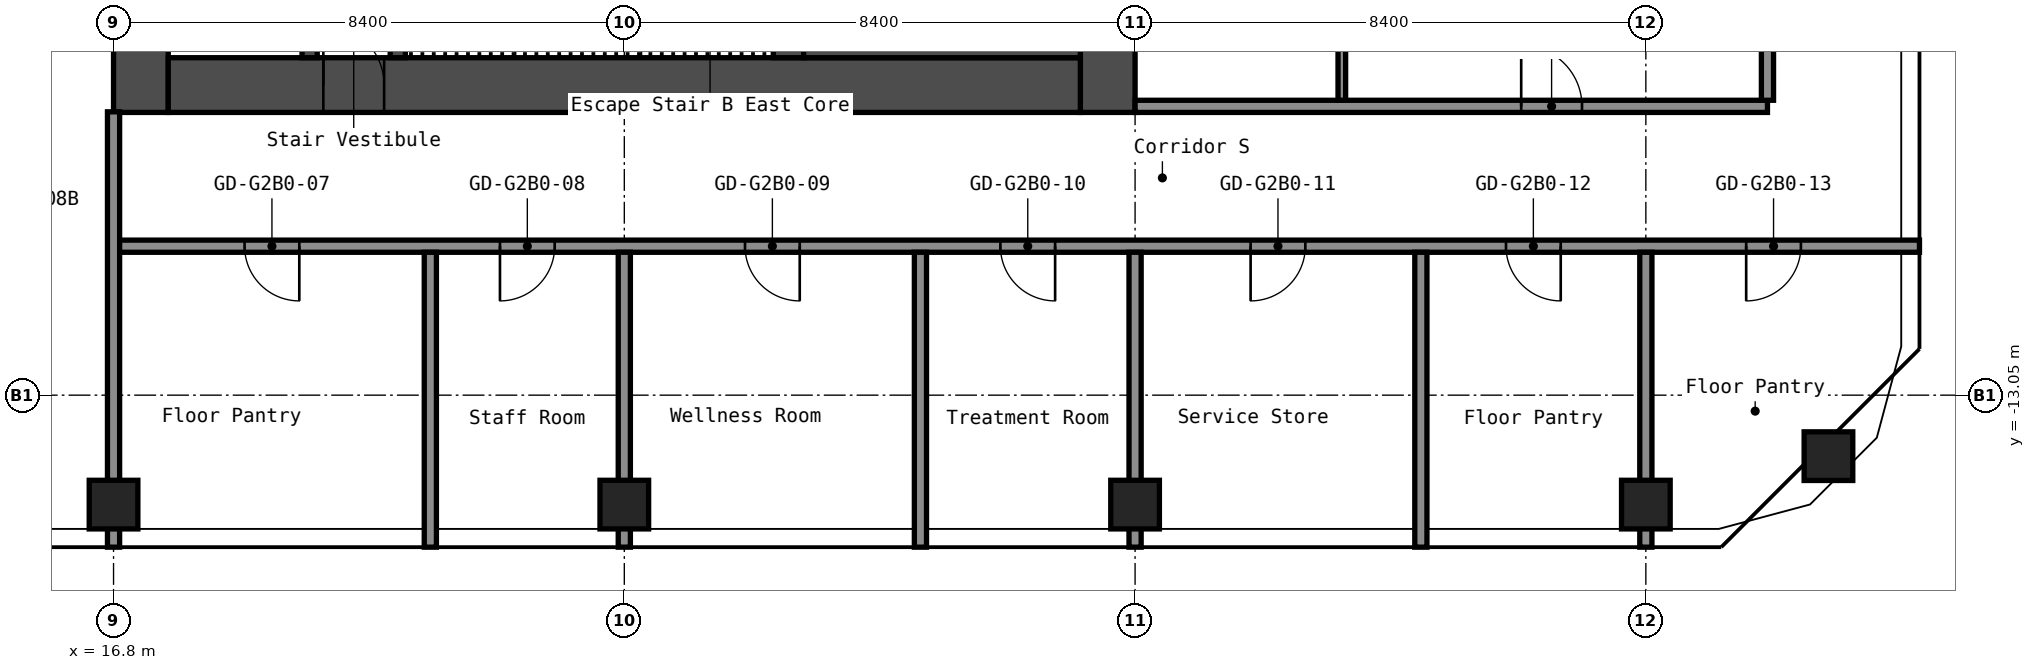
"""IFC4 building model, lengths in metres.
Left out: names, types, materials, properties, quantities, classifications, styles, units other than length and angle.
Written with IfcOpenShell. Run it as: python <this file> out.ifc"""

import sys

from ifc_helpers import new_model, si_unit, direction, frame, frame_2d, origin, origin_2d, place, context, subcontext, project, spatial, rectangle, hollow_rectangle, extrude, element, fill, save


model = new_model("IFC4")
c1 = context("Model", 3, precision=1e-05, world=origin(), true_north=direction((0.0, 1.0)))
c2 = subcontext(c1, "Body", "Model", "MODEL_VIEW")
j1 = project(units=[si_unit("LENGTHUNIT", "METRE"), si_unit("PLANEANGLEUNIT", "RADIAN")], contexts=[c1])
p1 = place(None, origin())
s1 = spatial("IfcSite", under=j1, at=p1, CompositionType="ELEMENT")
p2 = place(p1, origin())
s2 = spatial("IfcBuilding", under=s1, at=p2, CompositionType="ELEMENT")
p3 = place(p2, frame((0.0, 0.0, 78.6)))
s3 = spatial("IfcBuildingStorey", under=s2, at=p3, CompositionType="ELEMENT", Elevation=78.6)
for number, where, z_axis, x_axis in (
    (1, (16.8, -14.85, 0.0), (0.0, 0.0, 1.0), (1.0, 0.0, 0.0)),
    (2, (25.2, -14.85, 0.0), (0.0, 0.0, 1.0), (1.0, 0.0, 0.0)),
    (3, (33.6, -14.85, 0.0), (0.0, 0.0, 1.0), (1.0, 0.0, 0.0)),
    (4, (42.0, -14.85, 0.0), (0.0, 0.0, 1.0), (1.0, 0.0, 0.0)),
    (5, (45.003, -14.053, 0.0), (0.0, 0.0, 1.0), (1.0, 0.0, 0.0)),
):
    element("IfcColumn", number, at=place(p3, frame(where, z_axis=z_axis, x_axis=x_axis)), inside=s3, PredefinedType="COLUMN", context=c2, shape_type="SweptSolid", body=[
        extrude(hollow_rectangle(XDim=0.8, YDim=0.8, WallThickness=0.032, at=origin_2d()), origin(), (0.0, 0.0, 1.0), 2.8),
    ])
p4 = place(p3, frame((17.25, -8.4, 0.0), z_axis=(0.0, 0.0, 1.0), x_axis=(0.0, 1.0, 0.0)))
e6 = element("IfcWall", 6, at=p4, inside=s3, PredefinedType="SHEAR", context=c2, shape_type="SweptSolid", body=[
    extrude(rectangle(XDim=16.8, YDim=0.9, at=frame_2d((8.4, 0.0))), origin(), (0.0, 0.0, 1.0), 2.8),
])
p5 = place(p4, frame((7.6, 0.0, 0.0)))
e7 = element("IfcOpeningElement", 7, at=p5, cuts=e6, PredefinedType="OPENING", context=c2, shape_type="SweptSolid", body=[
    extrude(rectangle(XDim=1.2, YDim=2.1, at=frame_2d((0.6, 1.05))), frame((0.0, 0.46, 0.0), z_axis=(0.0, -1.0, 0.0), x_axis=(1.0, 0.0, 0.0)), (0.0, 0.0, 1.0), 0.92),
])
p6 = place(p3, frame((33.15, -8.4, 0.0), z_axis=(0.0, 0.0, 1.0), x_axis=(0.0, 1.0, 0.0)))
e8 = element("IfcWall", 8, at=p6, inside=s3, PredefinedType="SHEAR", context=c2, shape_type="SweptSolid", body=[
    extrude(rectangle(XDim=16.8, YDim=0.9, at=frame_2d((8.4, 0.0))), origin(), (0.0, 0.0, 1.0), 2.8),
])
p7 = place(p3, frame((17.7, -7.95, 0.0), z_axis=(0.0, 0.0, 1.0), x_axis=(1.0, 0.0, 0.0)))
e9 = element("IfcWall", 9, at=p7, inside=s3, PredefinedType="SHEAR", context=c2, shape_type="SweptSolid", body=[
    extrude(rectangle(XDim=15.0, YDim=0.9, at=frame_2d((7.5, 0.0))), origin(), (0.0, 0.0, 1.0), 2.8),
])
p8 = place(p7, frame((2.55, 0.0, 0.0)))
e10 = element("IfcOpeningElement", 10, at=p8, cuts=e9, PredefinedType="OPENING", context=c2, shape_type="SweptSolid", body=[
    extrude(rectangle(XDim=1.0, YDim=2.1, at=frame_2d((0.5, 1.05))), frame((0.0, 0.46, 0.0), z_axis=(0.0, -1.0, 0.0), x_axis=(1.0, 0.0, 0.0)), (0.0, 0.0, 1.0), 0.92),
])
p9 = place(p3, frame((20.025, -7.5, 0.0), z_axis=(0.0, 0.0, 1.0), x_axis=(0.0, 1.0, 0.0)))
e11 = element("IfcWall", 11, at=p9, inside=s3, PredefinedType="SHEAR", context=c2, shape_type="SweptSolid", body=[
    extrude(rectangle(XDim=6.3, YDim=0.25, at=frame_2d((3.15, 0.0))), origin(), (0.0, 0.0, 1.0), 2.8),
])
p10 = place(p9, frame((2.4, 0.0, 0.0)))
e12 = element("IfcOpeningElement", 12, at=p10, cuts=e11, PredefinedType="OPENING", context=c2, shape_type="SweptSolid", body=[
    extrude(rectangle(XDim=1.0, YDim=2.1, at=frame_2d((0.5, 1.05))), frame((0.0, 0.135, 0.0), z_axis=(0.0, -1.0, 0.0), x_axis=(1.0, 0.0, 0.0)), (0.0, 0.0, 1.0), 0.27),
])
p11 = place(p3, frame((21.475, -7.5, 0.0), z_axis=(0.0, 0.0, 1.0), x_axis=(0.0, 1.0, 0.0)))
e13 = element("IfcWall", 13, at=p11, inside=s3, PredefinedType="SHEAR", context=c2, shape_type="SweptSolid", body=[
    extrude(rectangle(XDim=3.75, YDim=0.25, at=frame_2d((1.875, 0.0))), origin(), (0.0, 0.0, 1.0), 2.8),
])
p12 = place(p11, frame((1.3, 0.0, 0.0)))
e14 = element("IfcOpeningElement", 14, at=p12, cuts=e13, PredefinedType="OPENING", context=c2, shape_type="SweptSolid", body=[
    extrude(rectangle(XDim=1.2, YDim=2.1, at=frame_2d((0.6, 1.05))), frame((0.0, 0.135, 0.0), z_axis=(0.0, -1.0, 0.0), x_axis=(1.0, 0.0, 0.0)), (0.0, 0.0, 1.0), 0.27),
])
p13 = place(p3, frame((27.9, -7.5, 0.0), z_axis=(0.0, 0.0, 1.0), x_axis=(0.0, 1.0, 0.0)))
e15 = element("IfcWall", 15, at=p13, inside=s3, PredefinedType="SHEAR", context=c2, shape_type="SweptSolid", body=[
    extrude(rectangle(XDim=3.75, YDim=0.5, at=frame_2d((1.875, 0.0))), origin(), (0.0, 0.0, 1.0), 2.8),
])
p14 = place(p3, frame((28.15, -6.75, 0.0), z_axis=(0.0, 0.0, 1.0), x_axis=(1.0, 0.0, 0.0)))
e16 = element("IfcWall", 16, at=p14, inside=s3, PredefinedType="SHEAR", context=c2, shape_type="SweptSolid", body=[
    extrude(rectangle(XDim=4.55, YDim=1.5, at=frame_2d((2.275, 0.0))), origin(), (0.0, 0.0, 1.0), 2.8),
])
p15 = place(p3, frame((16.8, -10.6, 0.0), z_axis=(0.0, 0.0, 1.0), x_axis=(1.0, 0.0, 0.0)))
e17 = element("IfcWall", 17, at=p15, inside=s3, PredefinedType="PARTITIONING", context=c2, shape_type="SweptSolid", body=[
    extrude(rectangle(XDim=29.7, YDim=0.2, at=frame_2d((14.85, 0.0))), origin(), (0.0, 0.0, 1.0), 2.8),
])
p16 = place(p15, frame((2.155, 0.0, 0.0)))
e18 = element("IfcOpeningElement", 18, at=p16, cuts=e17, PredefinedType="OPENING", context=c2, shape_type="SweptSolid", body=[
    extrude(rectangle(XDim=0.9, YDim=2.1, at=frame_2d((0.45, 1.05))), frame((0.0, 0.11, 0.0), z_axis=(0.0, -1.0, 0.0), x_axis=(1.0, 0.0, 0.0)), (0.0, 0.0, 1.0), 0.22),
])
p17 = place(p15, frame((6.355, 0.0, 0.0)))
e19 = element("IfcOpeningElement", 19, at=p17, cuts=e17, PredefinedType="OPENING", context=c2, shape_type="SweptSolid", body=[
    extrude(rectangle(XDim=0.9, YDim=2.1, at=frame_2d((0.45, 1.05))), frame((0.0, 0.11, 0.0), z_axis=(0.0, -1.0, 0.0), x_axis=(1.0, 0.0, 0.0)), (0.0, 0.0, 1.0), 0.22),
])
p18 = place(p15, frame((10.385, 0.0, 0.0)))
e20 = element("IfcOpeningElement", 20, at=p18, cuts=e17, PredefinedType="OPENING", context=c2, shape_type="SweptSolid", body=[
    extrude(rectangle(XDim=0.9, YDim=2.1, at=frame_2d((0.45, 1.05))), frame((0.0, 0.11, 0.0), z_axis=(0.0, -1.0, 0.0), x_axis=(1.0, 0.0, 0.0)), (0.0, 0.0, 1.0), 0.22),
])
p19 = place(p15, frame((14.585, 0.0, 0.0)))
e21 = element("IfcOpeningElement", 21, at=p19, cuts=e17, PredefinedType="OPENING", context=c2, shape_type="SweptSolid", body=[
    extrude(rectangle(XDim=0.9, YDim=2.1, at=frame_2d((0.45, 1.05))), frame((0.0, 0.11, 0.0), z_axis=(0.0, -1.0, 0.0), x_axis=(1.0, 0.0, 0.0)), (0.0, 0.0, 1.0), 0.22),
])
p20 = place(p15, frame((18.7, 0.0, 0.0)))
e22 = element("IfcOpeningElement", 22, at=p20, cuts=e17, PredefinedType="OPENING", context=c2, shape_type="SweptSolid", body=[
    extrude(rectangle(XDim=0.9, YDim=2.1, at=frame_2d((0.45, 1.05))), frame((0.0, 0.11, 0.0), z_axis=(0.0, -1.0, 0.0), x_axis=(1.0, 0.0, 0.0)), (0.0, 0.0, 1.0), 0.22),
])
p21 = place(p15, frame((22.9, 0.0, 0.0)))
e23 = element("IfcOpeningElement", 23, at=p21, cuts=e17, PredefinedType="OPENING", context=c2, shape_type="SweptSolid", body=[
    extrude(rectangle(XDim=0.9, YDim=2.1, at=frame_2d((0.45, 1.05))), frame((0.0, 0.11, 0.0), z_axis=(0.0, -1.0, 0.0), x_axis=(1.0, 0.0, 0.0)), (0.0, 0.0, 1.0), 0.22),
])
p22 = place(p15, frame((26.85, 0.0, 0.0)))
e24 = element("IfcOpeningElement", 24, at=p22, cuts=e17, PredefinedType="OPENING", context=c2, shape_type="SweptSolid", body=[
    extrude(rectangle(XDim=0.9, YDim=2.1, at=frame_2d((0.45, 1.05))), frame((0.0, 0.11, 0.0), z_axis=(0.0, -1.0, 0.0), x_axis=(1.0, 0.0, 0.0)), (0.0, 0.0, 1.0), 0.22),
])
p23 = place(p3, frame((33.6, -8.3, 0.0), z_axis=(0.0, 0.0, 1.0), x_axis=(1.0, 0.0, 0.0)))
e25 = element("IfcWall", 25, at=p23, inside=s3, PredefinedType="PARTITIONING", context=c2, shape_type="SweptSolid", body=[
    extrude(rectangle(XDim=10.4, YDim=0.2, at=frame_2d((5.2, 0.0))), origin(), (0.0, 0.0, 1.0), 2.8),
])
p24 = place(p23, frame((6.35, 0.0, 0.0)))
e26 = element("IfcOpeningElement", 26, at=p24, cuts=e25, PredefinedType="OPENING", context=c2, shape_type="SweptSolid", body=[
    extrude(rectangle(XDim=1.0, YDim=2.1, at=frame_2d((0.5, 1.05))), frame((0.0, 0.11, 0.0), z_axis=(0.0, -1.0, 0.0), x_axis=(1.0, 0.0, 0.0)), (0.0, 0.0, 1.0), 0.22),
])
p25 = place(p3, frame((16.8, -15.55, 0.0), z_axis=(0.0, 0.0, 1.0), x_axis=(0.0, 1.0, 0.0)))
e27 = element("IfcWall", 27, at=p25, inside=s3, PredefinedType="PARTITIONING", context=c2, shape_type="SweptSolid", body=[
    extrude(rectangle(XDim=7.16, YDim=0.2, at=frame_2d((3.58, 0.0))), origin(), (0.0, 0.0, 1.0), 2.8),
])
for number, where, z_axis, x_axis in (
    (28, (22.01, -15.55, 0.0), (0.0, 0.0, 1.0), (0.0, 1.0, 0.0)),
    (29, (25.2, -15.55, 0.0), (0.0, 0.0, 1.0), (0.0, 1.0, 0.0)),
    (30, (30.07, -15.55, 0.0), (0.0, 0.0, 1.0), (0.0, 1.0, 0.0)),
    (31, (33.6, -15.55, 0.0), (0.0, 0.0, 1.0), (0.0, 1.0, 0.0)),
):
    element("IfcWall", number, at=place(p3, frame(where, z_axis=z_axis, x_axis=x_axis)), inside=s3, PredefinedType="PARTITIONING", context=c2, shape_type="SweptSolid", body=[
        extrude(rectangle(XDim=4.85, YDim=0.2, at=frame_2d((2.425, 0.0))), origin(), (0.0, 0.0, 1.0), 2.8),
    ])
p26 = place(p3, frame((37.0, -8.2, 0.0), z_axis=(0.0, 0.0, 1.0), x_axis=(0.0, 1.0, 0.0)))
e32 = element("IfcWall", 32, at=p26, inside=s3, PredefinedType="PARTITIONING", context=c2, shape_type="SweptSolid", body=[
    extrude(rectangle(XDim=3.3, YDim=0.125, at=frame_2d((1.65, 0.0))), origin(), (0.0, 0.0, 1.0), 2.8),
])
for number, where, z_axis, x_axis in (
    (33, (38.3, -15.55, 0.0), (0.0, 0.0, 1.0), (0.0, 1.0, 0.0)),
    (34, (42.0, -15.55, 0.0), (0.0, 0.0, 1.0), (0.0, 1.0, 0.0)),
):
    element("IfcWall", number, at=place(p3, frame(where, z_axis=z_axis, x_axis=x_axis)), inside=s3, PredefinedType="PARTITIONING", context=c2, shape_type="SweptSolid", body=[
        extrude(rectangle(XDim=4.85, YDim=0.2, at=frame_2d((2.425, 0.0))), origin(), (0.0, 0.0, 1.0), 2.8),
    ])
p27 = place(p3, frame((44.0, -8.2, 0.0), z_axis=(0.0, 0.0, 1.0), x_axis=(0.0, 1.0, 0.0)))
e35 = element("IfcWall", 35, at=p27, inside=s3, PredefinedType="PARTITIONING", context=c2, shape_type="SweptSolid", body=[
    extrude(rectangle(XDim=16.4, YDim=0.2, at=frame_2d((8.2, 0.0))), origin(), (0.0, 0.0, 1.0), 2.8),
])
p28 = place(p8, origin())
e36 = element("IfcDoor", 36, at=p28, inside=s3, OperationType="SINGLE_SWING_RIGHT", PredefinedType="DOOR", context=c2, shape_type="SweptSolid", body=[
    extrude(rectangle(XDim=1.0, YDim=2.1, at=frame_2d((0.5, 1.05))), frame((0.0, 0.025, 0.0), z_axis=(0.0, -1.0, 0.0), x_axis=(1.0, 0.0, 0.0)), (0.0, 0.0, 1.0), 0.05),
])
fill(e10, e36)
p29 = place(p16, origin())
e37 = element("IfcDoor", 37, at=p29, inside=s3, OperationType="SINGLE_SWING_RIGHT", PredefinedType="DOOR", context=c2, shape_type="SweptSolid", body=[
    extrude(rectangle(XDim=0.9, YDim=2.1, at=frame_2d((0.45, 1.05))), frame((0.0, 0.025, 0.0), z_axis=(0.0, -1.0, 0.0), x_axis=(1.0, 0.0, 0.0)), (0.0, 0.0, 1.0), 0.05),
])
fill(e18, e37)
p30 = place(p17, origin())
e38 = element("IfcDoor", 38, at=p30, inside=s3, OperationType="SINGLE_SWING_LEFT", PredefinedType="DOOR", context=c2, shape_type="SweptSolid", body=[
    extrude(rectangle(XDim=0.9, YDim=2.1, at=frame_2d((0.45, 1.05))), frame((0.0, 0.025, 0.0), z_axis=(0.0, -1.0, 0.0), x_axis=(1.0, 0.0, 0.0)), (0.0, 0.0, 1.0), 0.05),
])
fill(e19, e38)
p31 = place(p18, origin())
e39 = element("IfcDoor", 39, at=p31, inside=s3, OperationType="SINGLE_SWING_RIGHT", PredefinedType="DOOR", context=c2, shape_type="SweptSolid", body=[
    extrude(rectangle(XDim=0.9, YDim=2.1, at=frame_2d((0.45, 1.05))), frame((0.0, 0.025, 0.0), z_axis=(0.0, -1.0, 0.0), x_axis=(1.0, 0.0, 0.0)), (0.0, 0.0, 1.0), 0.05),
])
fill(e20, e39)
p32 = place(p19, origin())
e40 = element("IfcDoor", 40, at=p32, inside=s3, OperationType="SINGLE_SWING_RIGHT", PredefinedType="DOOR", context=c2, shape_type="SweptSolid", body=[
    extrude(rectangle(XDim=0.9, YDim=2.1, at=frame_2d((0.45, 1.05))), frame((0.0, 0.025, 0.0), z_axis=(0.0, -1.0, 0.0), x_axis=(1.0, 0.0, 0.0)), (0.0, 0.0, 1.0), 0.05),
])
fill(e21, e40)
p33 = place(p20, origin())
e41 = element("IfcDoor", 41, at=p33, inside=s3, OperationType="SINGLE_SWING_LEFT", PredefinedType="DOOR", context=c2, shape_type="SweptSolid", body=[
    extrude(rectangle(XDim=0.9, YDim=2.1, at=frame_2d((0.45, 1.05))), frame((0.0, 0.025, 0.0), z_axis=(0.0, -1.0, 0.0), x_axis=(1.0, 0.0, 0.0)), (0.0, 0.0, 1.0), 0.05),
])
fill(e22, e41)
p34 = place(p21, origin())
e42 = element("IfcDoor", 42, at=p34, inside=s3, OperationType="SINGLE_SWING_RIGHT", PredefinedType="DOOR", context=c2, shape_type="SweptSolid", body=[
    extrude(rectangle(XDim=0.9, YDim=2.1, at=frame_2d((0.45, 1.05))), frame((0.0, 0.025, 0.0), z_axis=(0.0, -1.0, 0.0), x_axis=(1.0, 0.0, 0.0)), (0.0, 0.0, 1.0), 0.05),
])
fill(e23, e42)
p35 = place(p22, origin())
e43 = element("IfcDoor", 43, at=p35, inside=s3, OperationType="SINGLE_SWING_LEFT", PredefinedType="DOOR", context=c2, shape_type="SweptSolid", body=[
    extrude(rectangle(XDim=0.9, YDim=2.1, at=frame_2d((0.45, 1.05))), frame((0.0, 0.025, 0.0), z_axis=(0.0, -1.0, 0.0), x_axis=(1.0, 0.0, 0.0)), (0.0, 0.0, 1.0), 0.05),
])
fill(e24, e43)
p36 = place(p24, origin())
e44 = element("IfcDoor", 44, at=p36, inside=s3, OperationType="SINGLE_SWING_RIGHT", PredefinedType="DOOR", context=c2, shape_type="SweptSolid", body=[
    extrude(rectangle(XDim=1.0, YDim=2.1, at=frame_2d((0.5, 1.05))), frame((0.0, 0.025, 0.0), z_axis=(0.0, -1.0, 0.0), x_axis=(1.0, 0.0, 0.0)), (0.0, 0.0, 1.0), 0.05),
])
fill(e26, e44)
save(model, sys.argv[1])
